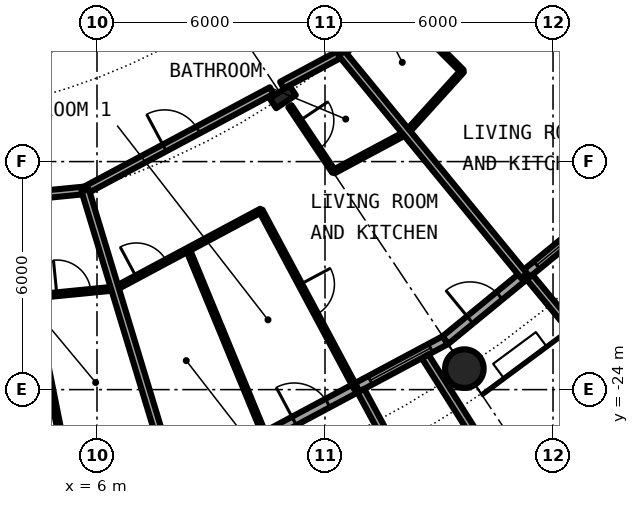
"""IFC4 building model, lengths in metres.
Left out: names, types, materials, properties, quantities, classifications, styles, units other than length and angle.
Written with IfcOpenShell. Run it as: python <this file> out.ifc"""

import sys

from ifc_helpers import new_model, si_unit, direction, frame, frame_2d, origin, origin_2d, place, context, subcontext, project, spatial, rectangle, hollow_circle, i_section, extrude, element, fill, save


model = new_model("IFC4")
c1 = context("Model", 3, precision=1e-05, world=origin(), true_north=direction((0.0, 1.0)))
c2 = subcontext(c1, "Body", "Model", "MODEL_VIEW")
j1 = project(units=[si_unit("LENGTHUNIT", "METRE"), si_unit("PLANEANGLEUNIT", "RADIAN")], contexts=[c1])
p1 = place(None, origin())
s1 = spatial("IfcSite", under=j1, at=p1, CompositionType="ELEMENT")
p2 = place(p1, origin())
s2 = spatial("IfcBuilding", under=s1, at=p2, CompositionType="ELEMENT")
p3 = place(p2, frame((0.0, 0.0, 50.25)))
s3 = spatial("IfcBuildingStorey", under=s2, at=p3, CompositionType="ELEMENT", Elevation=50.25)
p4 = place(p3, frame((15.667, -23.448, 0.0), z_axis=(0.0, 0.0, 1.0), x_axis=(1.0, 0.0, 0.0)))
e1 = element("IfcColumn", 1, at=p4, inside=s3, PredefinedType="COLUMN", context=c2, shape_type="SweptSolid", body=[
    extrude(hollow_circle(Radius=0.508, WallThickness=0.05, at=origin_2d()), origin(), (0.0, 0.0, 1.0), 3.05),
])
p5 = place(p3, frame((10.889, -16.297, 0.0), z_axis=(0.0, 0.0, 1.0), x_axis=(0.55557023302, -0.831469612303, 0.0)))
e2 = element("IfcColumn", 2, at=p5, inside=s3, PredefinedType="COLUMN", context=c2, shape_type="SweptSolid", body=[
    extrude(i_section(OverallWidth=0.305, OverallDepth=0.62, WebThickness=0.021, FlangeThickness=0.04, FilletRadius=0.027, at=origin_2d()), origin(), (0.0, 0.0, 1.0), 3.05),
])
p6 = place(p3, frame((10.447, -25.222, 0.0), z_axis=(0.0, 0.0, 1.0), x_axis=(0.881915646801, 0.471407246368, 0.0)))
e3 = element("IfcWall", 3, at=p6, inside=s3, PredefinedType="SOLIDWALL", context=c2, shape_type="SweptSolid", body=[
    extrude(rectangle(XDim=5.352, YDim=0.25, at=frame_2d((2.676, 0.0))), origin(), (0.0, 0.0, 1.0), 2.7),
])
p7 = place(p6, frame((0.841, 0.0, 0.0)))
e4 = element("IfcOpeningElement", 4, at=p7, cuts=e3, PredefinedType="OPENING", context=c2, shape_type="SweptSolid", body=[
    extrude(rectangle(XDim=1.0, YDim=2.2, at=frame_2d((0.5, 1.1))), frame((0.0, 0.135, 0.0), z_axis=(0.0, -1.0, 0.0), x_axis=(1.0, 0.0, 0.0)), (0.0, 0.0, 1.0), 0.27),
])
p8 = place(p6, frame((3.111, 0.0, 0.3)))
e5 = element("IfcOpeningElement", 5, at=p8, cuts=e3, PredefinedType="OPENING", context=c2, shape_type="SweptSolid", body=[
    extrude(rectangle(XDim=1.8, YDim=2.1, at=frame_2d((0.9, 1.05))), frame((0.0, 0.135, 0.0), z_axis=(0.0, -1.0, 0.0), x_axis=(1.0, 0.0, 0.0)), (0.0, 0.0, 1.0), 0.27),
])
p9 = place(p3, frame((12.945, -24.029, -0.03), z_axis=(0.0, 0.0, 1.0), x_axis=(0.474424310775, -0.88029629861, 0.0)))
e6 = element("IfcWall", 6, at=p9, inside=s3, PredefinedType="SOLIDWALL", context=c2, shape_type="SweptSolid", body=[
    extrude(rectangle(XDim=3.006, YDim=0.2, at=frame_2d((1.503, 0.0))), origin(), (0.0, 0.0, 1.0), 2.73),
])
p10 = place(p3, frame((14.635, -23.126, -0.03), z_axis=(0.0, 0.0, 1.0), x_axis=(0.534437802731, -0.845207805816, 0.0)))
e7 = element("IfcWall", 7, at=p10, inside=s3, PredefinedType="SOLIDWALL", context=c2, shape_type="SweptSolid", body=[
    extrude(rectangle(XDim=2.932, YDim=0.2, at=frame_2d((1.466, 0.0))), origin(), (0.0, 0.0, 1.0), 2.73),
])
p11 = place(p3, frame((15.167, -22.699, 0.0), z_axis=(0.0, 0.0, 1.0), x_axis=(0.773019449054, 0.634382322723, 0.0)))
e8 = element("IfcWall", 8, at=p11, inside=s3, PredefinedType="SOLIDWALL", context=c2, shape_type="SweptSolid", body=[
    extrude(rectangle(XDim=5.352, YDim=0.25, at=frame_2d((2.676, 0.0))), origin(), (0.0, 0.0, 1.0), 2.7),
])
p12 = place(p11, frame((0.841, 0.0, 0.0)))
e9 = element("IfcOpeningElement", 9, at=p12, cuts=e8, PredefinedType="OPENING", context=c2, shape_type="SweptSolid", body=[
    extrude(rectangle(XDim=1.0, YDim=2.2, at=frame_2d((0.5, 1.1))), frame((0.0, 0.135, 0.0), z_axis=(0.0, -1.0, 0.0), x_axis=(1.0, 0.0, 0.0)), (0.0, 0.0, 1.0), 0.27),
])
p13 = place(p11, frame((3.111, 0.0, 0.3)))
e10 = element("IfcOpeningElement", 10, at=p13, cuts=e8, PredefinedType="OPENING", context=c2, shape_type="SweptSolid", body=[
    extrude(rectangle(XDim=1.8, YDim=2.1, at=frame_2d((0.9, 1.05))), frame((0.0, 0.135, 0.0), z_axis=(0.0, -1.0, 0.0), x_axis=(1.0, 0.0, 0.0)), (0.0, 0.0, 1.0), 0.27),
])
p14 = place(p3, frame((17.384, -21.041, -0.03), z_axis=(0.0, 0.0, 1.0), x_axis=(0.63709551667, -0.770784861449, 0.0)))
e11 = element("IfcWall", 11, at=p14, inside=s3, PredefinedType="SOLIDWALL", context=c2, shape_type="SweptSolid", body=[
    extrude(rectangle(XDim=3.006, YDim=0.2, at=frame_2d((1.503, 0.0))), origin(), (0.0, 0.0, 1.0), 2.73),
])
p15 = place(p3, frame((14.153, -17.234, 0.0), z_axis=(0.0, 0.0, 1.0), x_axis=(0.671144831591, 0.741326254107, 0.0)))
e12 = element("IfcWall", 12, at=p15, inside=s3, PredefinedType="PARTITIONING", context=c2, shape_type="SweptSolid", body=[
    extrude(rectangle(XDim=2.181, YDim=0.1, at=frame_2d((1.091, 0.0))), origin(), (0.0, 0.0, 1.0), 2.7),
])
p16 = place(p3, frame((2.144, -21.766, 0.0), z_axis=(0.0, 0.0, 1.0), x_axis=(0.995192120883, 0.097942036599, 0.0)))
e13 = element("IfcWall", 13, at=p16, inside=s3, PredefinedType="PARTITIONING", context=c2, shape_type="SweptSolid", body=[
    extrude(rectangle(XDim=4.35, YDim=0.1, at=frame_2d((2.175, 0.0))), origin(), (0.0, 0.0, 1.0), 2.7),
])
p17 = place(p16, frame((2.812, 0.0, 0.0)))
e14 = element("IfcOpeningElement", 14, at=p17, cuts=e13, PredefinedType="OPENING", context=c2, shape_type="SweptSolid", body=[
    extrude(rectangle(XDim=0.9, YDim=2.3, at=frame_2d((0.45, 1.15))), frame((0.0, 0.06, 0.0), z_axis=(0.0, -1.0, 0.0), x_axis=(1.0, 0.0, 0.0)), (0.0, 0.0, 1.0), 0.12),
])
p18 = place(p3, frame((6.478, -21.34, 0.0), z_axis=(0.0, 0.0, 1.0), x_axis=(0.881765663848, 0.471687729392, 0.0)))
e15 = element("IfcWall", 15, at=p18, inside=s3, PredefinedType="PARTITIONING", context=c2, shape_type="SweptSolid", body=[
    extrude(rectangle(XDim=4.355, YDim=0.1, at=frame_2d((2.177, 0.0))), origin(), (0.0, 0.0, 1.0), 2.7),
])
p19 = place(p18, frame((0.633, 0.0, 0.0)))
e16 = element("IfcOpeningElement", 16, at=p19, cuts=e15, PredefinedType="OPENING", context=c2, shape_type="SweptSolid", body=[
    extrude(rectangle(XDim=0.9, YDim=2.3, at=frame_2d((0.45, 1.15))), frame((0.0, 0.06, 0.0), z_axis=(0.0, -1.0, 0.0), x_axis=(1.0, 0.0, 0.0)), (0.0, 0.0, 1.0), 0.12),
])
p20 = place(p3, frame((12.229, -18.264, 0.0), z_axis=(0.0, 0.0, 1.0), x_axis=(0.881786813167, 0.471648191055, 0.0)))
e17 = element("IfcWall", 17, at=p20, inside=s3, PredefinedType="PARTITIONING", context=c2, shape_type="SweptSolid", body=[
    extrude(rectangle(XDim=2.175, YDim=0.1, at=frame_2d((1.087, 0.0))), origin(), (0.0, 0.0, 1.0), 2.7),
])
p21 = place(p3, frame((12.434, -15.151, 0.0), z_axis=(0.0, 0.0, 1.0), x_axis=(0.671514934772, 0.740991020444, 0.0)))
e18 = element("IfcWall", 18, at=p21, inside=s3, PredefinedType="PARTITIONING", context=c2, shape_type="SweptSolid", body=[
    extrude(rectangle(XDim=5.598, YDim=0.2, at=frame_2d((2.799, 0.0))), origin(), (0.0, 0.0, 1.0), 2.38),
])
p22 = place(p21, frame((3.305, 0.0, 0.0)))
e19 = element("IfcOpeningElement", 19, at=p22, cuts=e18, PredefinedType="OPENING", context=c2, shape_type="SweptSolid", body=[
    extrude(rectangle(XDim=1.0, YDim=2.3, at=frame_2d((0.5, 1.15))), frame((0.0, 0.11, 0.0), z_axis=(0.0, -1.0, 0.0), x_axis=(1.0, 0.0, 0.0)), (0.0, 0.0, 1.0), 0.22),
])
p23 = place(p3, frame((3.921, -18.93, 0.0), z_axis=(0.0, 0.0, 1.0), x_axis=(0.995207057161, 0.097790149696, 0.0)))
e20 = element("IfcWall", 20, at=p23, inside=s3, PredefinedType="PARTITIONING", context=c2, shape_type="SweptSolid", body=[
    extrude(rectangle(XDim=1.778, YDim=0.2, at=frame_2d((0.889, 0.0))), origin(), (0.0, 0.0, 1.0), 2.38),
])
p24 = place(p3, frame((5.69, -18.756, 0.0), z_axis=(0.0, 0.0, 1.0), x_axis=(0.881866548297, 0.471499089072, 0.0)))
e21 = element("IfcWall", 21, at=p24, inside=s3, PredefinedType="PARTITIONING", context=c2, shape_type="SweptSolid", body=[
    extrude(rectangle(XDim=5.563, YDim=0.2, at=frame_2d((2.782, 0.0))), origin(), (0.0, 0.0, 1.0), 2.38),
])
p25 = place(p24, frame((2.368, 0.0, 0.0)))
e22 = element("IfcOpeningElement", 22, at=p25, cuts=e21, PredefinedType="OPENING", context=c2, shape_type="SweptSolid", body=[
    extrude(rectangle(XDim=1.0, YDim=2.3, at=frame_2d((0.5, 1.15))), frame((0.0, 0.11, 0.0), z_axis=(0.0, -1.0, 0.0), x_axis=(1.0, 0.0, 0.0)), (0.0, 0.0, 1.0), 0.22),
])
p26 = place(p3, frame((10.867, -15.989, 0.0), z_axis=(0.0, 0.0, 1.0), x_axis=(0.881596178172, 0.472004426496, 0.0)))
e23 = element("IfcWall", 23, at=p26, inside=s3, PredefinedType="PARTITIONING", context=c2, shape_type="SweptSolid", body=[
    extrude(rectangle(XDim=1.78, YDim=0.2, at=frame_2d((0.89, 0.0))), origin(), (0.0, 0.0, 1.0), 2.38),
])
p27 = place(p3, frame((1.656, -16.819, 0.0), z_axis=(0.0, 0.0, 1.0), x_axis=(0.857773470126, 0.514027892189, 0.0)))
e24 = element("IfcWall", 24, at=p27, inside=s3, PredefinedType="PARTITIONING", context=c2, shape_type="SweptSolid", body=[
    extrude(rectangle(XDim=14.429, YDim=0.2, at=frame_2d((7.215, 0.0))), origin(), (0.0, 0.0, 1.0), 2.7),
])
p28 = place(p27, frame((4.318, 0.0, 0.0)))
e25 = element("IfcOpeningElement", 25, at=p28, cuts=e24, PredefinedType="OPENING", context=c2, shape_type="SweptSolid", body=[
    extrude(rectangle(XDim=1.0, YDim=2.3, at=frame_2d((0.5, 1.15))), frame((0.0, 0.11, 0.0), z_axis=(0.0, -1.0, 0.0), x_axis=(1.0, 0.0, 0.0)), (0.0, 0.0, 1.0), 0.22),
])
p29 = place(p3, frame((4.309, -21.553, 0.0), z_axis=(0.0, 0.0, 1.0), x_axis=(0.195899255693, -0.980624026638, 0.0)))
e26 = element("IfcWall", 26, at=p29, inside=s3, PredefinedType="PARTITIONING", context=c2, shape_type="SweptSolid", body=[
    extrude(rectangle(XDim=5.196, YDim=0.1, at=frame_2d((2.598, 0.0))), origin(), (0.0, 0.0, 1.0), 2.7),
])
p30 = place(p3, frame((5.689, -18.756, 0.0), z_axis=(0.0, 0.0, 1.0), x_axis=(0.290294523619, -0.956937348815, 0.0)))
e27 = element("IfcWall", 27, at=p30, inside=s3, PredefinedType="PARTITIONING", context=c2, shape_type="SweptSolid", body=[
    extrude(rectangle(XDim=7.575, YDim=0.2, at=frame_2d((3.788, 0.0))), origin(), (0.0, 0.0, 1.0), 2.7),
])
p31 = place(p3, frame((8.392, -20.314, 0.0), z_axis=(0.0, 0.0, 1.0), x_axis=(0.381673756215, -0.924297107978, 0.0)))
e28 = element("IfcWall", 28, at=p31, inside=s3, PredefinedType="PARTITIONING", context=c2, shape_type="SweptSolid", body=[
    extrude(rectangle(XDim=5.195, YDim=0.1, at=frame_2d((2.598, 0.0))), origin(), (0.0, 0.0, 1.0), 2.7),
])
p32 = place(p3, frame((10.31, -19.289, 0.0), z_axis=(0.0, 0.0, 1.0), x_axis=(0.47140999111, -0.881914179658, 0.0)))
e29 = element("IfcWall", 29, at=p32, inside=s3, PredefinedType="PARTITIONING", context=c2, shape_type="SweptSolid", body=[
    extrude(rectangle(XDim=5.303, YDim=0.1, at=frame_2d((2.652, 0.0))), origin(), (0.0, 0.0, 1.0), 2.7),
])
p33 = place(p32, frame((2.202, 0.0, 0.0)))
e30 = element("IfcOpeningElement", 30, at=p33, cuts=e29, PredefinedType="OPENING", context=c2, shape_type="SweptSolid", body=[
    extrude(rectangle(XDim=0.9, YDim=2.3, at=frame_2d((0.45, 1.15))), frame((0.0, 0.06, 0.0), z_axis=(0.0, -1.0, 0.0), x_axis=(1.0, 0.0, 0.0)), (0.0, 0.0, 1.0), 0.12),
])
p34 = place(p3, frame((11.077, -16.544, 0.0), z_axis=(0.0, 0.0, 1.0), x_axis=(0.556522278225, -0.830832687031, 0.0)))
e31 = element("IfcWall", 31, at=p34, inside=s3, PredefinedType="PARTITIONING", context=c2, shape_type="SweptSolid", body=[
    extrude(rectangle(XDim=2.07, YDim=0.1, at=frame_2d((1.035, 0.0))), origin(), (0.0, 0.0, 1.0), 2.7),
])
p35 = place(p34, frame((0.458, 0.0, 0.0)))
e32 = element("IfcOpeningElement", 32, at=p35, cuts=e31, PredefinedType="OPENING", context=c2, shape_type="SweptSolid", body=[
    extrude(rectangle(XDim=0.9, YDim=2.3, at=frame_2d((0.45, 1.15))), frame((0.0, 0.06, 0.0), z_axis=(0.0, -1.0, 0.0), x_axis=(1.0, 0.0, 0.0)), (0.0, 0.0, 1.0), 0.12),
])
p36 = place(p3, frame((12.434, -15.151, 0.0), z_axis=(0.0, 0.0, 1.0), x_axis=(0.634381303318, -0.773020285633, 0.0)))
e33 = element("IfcWall", 33, at=p36, inside=s3, PredefinedType="PARTITIONING", context=c2, shape_type="SweptSolid", body=[
    extrude(rectangle(XDim=7.576, YDim=0.2, at=frame_2d((3.788, 0.0))), origin(), (0.0, 0.0, 1.0), 2.7),
])
p37 = place(p3, frame((13.722, -13.73, 0.0), z_axis=(0.0, 0.0, 1.0), x_axis=(0.706741540154, -0.707471833659, 0.0)))
e34 = element("IfcWall", 34, at=p37, inside=s3, PredefinedType="PARTITIONING", context=c2, shape_type="SweptSolid", body=[
    extrude(rectangle(XDim=2.674, YDim=0.1, at=frame_2d((1.337, 0.0))), origin(), (0.0, 0.0, 1.0), 2.7),
])
p38 = place(p37, frame((0.887, 0.0, 0.0)))
e35 = element("IfcOpeningElement", 35, at=p38, cuts=e34, PredefinedType="OPENING", context=c2, shape_type="SweptSolid", body=[
    extrude(rectangle(XDim=0.9, YDim=2.3, at=frame_2d((0.45, 1.15))), frame((0.0, 0.06, 0.0), z_axis=(0.0, -1.0, 0.0), x_axis=(1.0, 0.0, 0.0)), (0.0, 0.0, 1.0), 0.12),
])
p39 = place(p3, frame((16.555, -11.061, 0.0), z_axis=(0.0, 0.0, 1.0), x_axis=(0.831465568067, -0.555576285599, 0.0)))
e36 = element("IfcWall", 36, at=p39, inside=s3, PredefinedType="PARTITIONING", context=c2, shape_type="SweptSolid", body=[
    extrude(rectangle(XDim=7.264, YDim=0.2, at=frame_2d((3.632, 0.0))), origin(), (0.0, 0.0, 1.0), 2.7),
])
p40 = place(p3, frame((17.077, -14.006, 0.0), z_axis=(0.0, 0.0, 1.0), x_axis=(0.77326214499, -0.634086472908, 0.0)))
e37 = element("IfcWall", 37, at=p40, inside=s3, PredefinedType="PARTITIONING", context=c2, shape_type="SweptSolid", body=[
    extrude(rectangle(XDim=5.089, YDim=0.1, at=frame_2d((2.544, 0.0))), origin(), (0.0, 0.0, 1.0), 2.7),
])
p41 = place(p40, frame((2.094, 0.0, 0.0)))
e38 = element("IfcOpeningElement", 38, at=p41, cuts=e37, PredefinedType="OPENING", context=c2, shape_type="SweptSolid", body=[
    extrude(rectangle(XDim=0.9, YDim=2.3, at=frame_2d((0.45, 1.15))), frame((0.0, 0.06, 0.0), z_axis=(0.0, -1.0, 0.0), x_axis=(1.0, 0.0, 0.0)), (0.0, 0.0, 1.0), 0.12),
])
p42 = place(p7, origin())
e39 = element("IfcDoor", 39, at=p42, inside=s3, OperationType="SINGLE_SWING_LEFT", PredefinedType="DOOR", context=c2, shape_type="SweptSolid", body=[
    extrude(rectangle(XDim=1.0, YDim=2.2, at=frame_2d((0.5, 1.1))), frame((0.0, 0.025, 0.0), z_axis=(0.0, -1.0, 0.0), x_axis=(1.0, 0.0, 0.0)), (0.0, 0.0, 1.0), 0.05),
])
fill(e4, e39)
p43 = place(p8, origin())
e40 = element("IfcWindow", 40, at=p43, inside=s3, PartitioningType="SINGLE_PANEL", PredefinedType="WINDOW", context=c2, shape_type="SweptSolid", body=[
    extrude(rectangle(XDim=1.8, YDim=2.1, at=frame_2d((0.9, 1.05))), frame((0.0, 0.03, 0.0), z_axis=(0.0, -1.0, 0.0), x_axis=(1.0, 0.0, 0.0)), (0.0, 0.0, 1.0), 0.06),
])
fill(e5, e40)
p44 = place(p12, origin())
e41 = element("IfcDoor", 41, at=p44, inside=s3, OperationType="SINGLE_SWING_LEFT", PredefinedType="DOOR", context=c2, shape_type="SweptSolid", body=[
    extrude(rectangle(XDim=1.0, YDim=2.2, at=frame_2d((0.5, 1.1))), frame((0.0, 0.025, 0.0), z_axis=(0.0, -1.0, 0.0), x_axis=(1.0, 0.0, 0.0)), (0.0, 0.0, 1.0), 0.05),
])
fill(e9, e41)
p45 = place(p13, origin())
e42 = element("IfcWindow", 42, at=p45, inside=s3, PartitioningType="SINGLE_PANEL", PredefinedType="WINDOW", context=c2, shape_type="SweptSolid", body=[
    extrude(rectangle(XDim=1.8, YDim=2.1, at=frame_2d((0.9, 1.05))), frame((0.0, 0.03, 0.0), z_axis=(0.0, -1.0, 0.0), x_axis=(1.0, 0.0, 0.0)), (0.0, 0.0, 1.0), 0.06),
])
fill(e10, e42)
p46 = place(p17, origin())
e43 = element("IfcDoor", 43, at=p46, inside=s3, OperationType="SINGLE_SWING_RIGHT", PredefinedType="DOOR", context=c2, shape_type="SweptSolid", body=[
    extrude(rectangle(XDim=0.9, YDim=2.3, at=frame_2d((0.45, 1.15))), frame((0.0, 0.025, 0.0), z_axis=(0.0, -1.0, 0.0), x_axis=(1.0, 0.0, 0.0)), (0.0, 0.0, 1.0), 0.05),
])
fill(e14, e43)
p47 = place(p25, origin())
e44 = element("IfcDoor", 44, at=p47, inside=s3, OperationType="SINGLE_SWING_RIGHT", PredefinedType="DOOR", context=c2, shape_type="SweptSolid", body=[
    extrude(rectangle(XDim=1.0, YDim=2.3, at=frame_2d((0.5, 1.15))), frame((0.0, 0.025, 0.0), z_axis=(0.0, -1.0, 0.0), x_axis=(1.0, 0.0, 0.0)), (0.0, 0.0, 1.0), 0.05),
])
fill(e22, e44)
p48 = place(p35, origin())
e45 = element("IfcDoor", 45, at=p48, inside=s3, OperationType="SINGLE_SWING_LEFT", PredefinedType="DOOR", context=c2, shape_type="SweptSolid", body=[
    extrude(rectangle(XDim=0.9, YDim=2.3, at=frame_2d((0.45, 1.15))), frame((0.0, 0.025, 0.0), z_axis=(0.0, -1.0, 0.0), x_axis=(1.0, 0.0, 0.0)), (0.0, 0.0, 1.0), 0.05),
])
fill(e32, e45)
p49 = place(p33, origin())
e46 = element("IfcDoor", 46, at=p49, inside=s3, OperationType="SINGLE_SWING_RIGHT", PredefinedType="DOOR", context=c2, shape_type="SweptSolid", body=[
    extrude(rectangle(XDim=0.9, YDim=2.3, at=frame_2d((0.45, 1.15))), frame((0.0, 0.025, 0.0), z_axis=(0.0, -1.0, 0.0), x_axis=(1.0, 0.0, 0.0)), (0.0, 0.0, 1.0), 0.05),
])
fill(e30, e46)
p50 = place(p19, origin())
e47 = element("IfcDoor", 47, at=p50, inside=s3, OperationType="SINGLE_SWING_LEFT", PredefinedType="DOOR", context=c2, shape_type="SweptSolid", body=[
    extrude(rectangle(XDim=0.9, YDim=2.3, at=frame_2d((0.45, 1.15))), frame((0.0, 0.025, 0.0), z_axis=(0.0, -1.0, 0.0), x_axis=(1.0, 0.0, 0.0)), (0.0, 0.0, 1.0), 0.05),
])
fill(e16, e47)
save(model, sys.argv[1])
